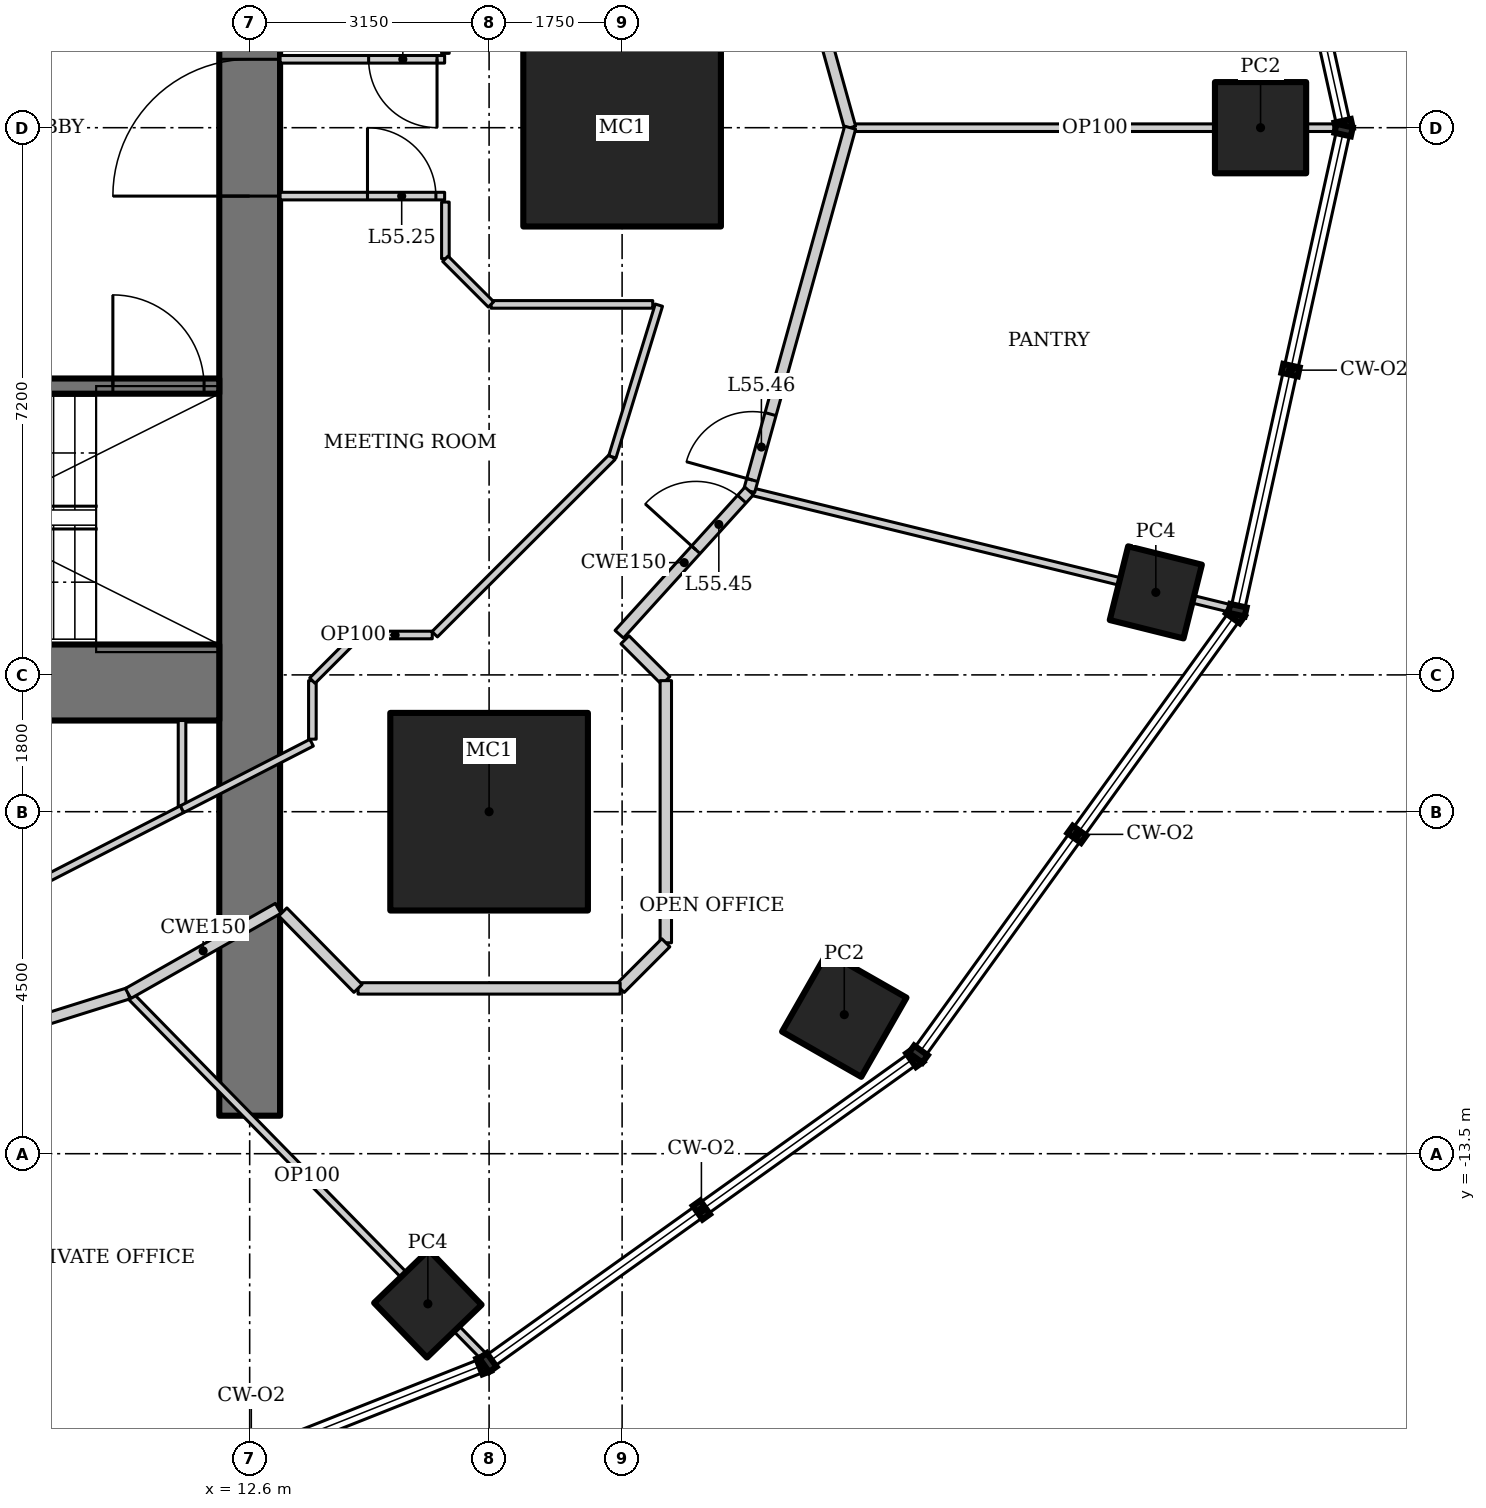
"""IFC4 building model, lengths in metres.
Left out: names, types, materials, properties, quantities, classifications, styles, units other than length and angle.
Written with IfcOpenShell. Run it as: python <this file> out.ifc"""

import sys

from ifc_helpers import new_model, si_unit, direction, frame, frame_2d, origin, origin_2d, place, context, subcontext, project, spatial, rectangle, hollow_rectangle, extrude, element, fill, save


model = new_model("IFC4")
c1 = context("Model", 3, precision=1e-05, world=origin(), true_north=direction((0.0, 1.0)))
c2 = subcontext(c1, "Body", "Model", "MODEL_VIEW")
j1 = project(units=[si_unit("LENGTHUNIT", "METRE"), si_unit("PLANEANGLEUNIT", "RADIAN")], contexts=[c1])
p1 = place(None, origin())
s1 = spatial("IfcSite", under=j1, at=p1, CompositionType="ELEMENT")
p2 = place(p1, origin())
s2 = spatial("IfcBuilding", under=s1, at=p2, CompositionType="ELEMENT")
p3 = place(p2, frame((0.0, 0.0, 236.8)))
s3 = spatial("IfcBuildingStorey", under=s2, at=p3, CompositionType="ELEMENT", Elevation=236.8)
for number, where, z_axis, x_axis in (
    (1, (17.5, 0.0, 0.0), (0.0, 0.0, 1.0), (1.0, 0.0, 0.0)),
    (2, (15.75, -9.0, 0.0), (0.0, 0.0, 1.0), (1.0, 0.0, 0.0)),
):
    element("IfcColumn", number, at=place(p3, frame(where, z_axis=z_axis, x_axis=x_axis)), inside=s3, PredefinedType="COLUMN", context=c2, shape_type="SweptSolid", body=[
        extrude(hollow_rectangle(XDim=2.6, YDim=2.6, WallThickness=0.13, at=origin_2d()), origin(), (0.0, 0.0, 1.0), 4.2),
    ])
p4 = place(p3, frame((25.9, 0.0, 0.0), z_axis=(0.0, 0.0, 1.0), x_axis=(1.0, 0.0, 0.0)))
e3 = element("IfcColumn", 3, at=p4, inside=s3, PredefinedType="COLUMN", context=c2, shape_type="SweptSolid", body=[
    extrude(hollow_rectangle(XDim=1.2, YDim=1.2, WallThickness=0.1, at=origin_2d()), origin(), (0.0, 0.0, 1.0), 4.2),
])
p5 = place(p3, frame((14.944, -15.475, 0.0), z_axis=(0.0, 0.0, 1.0), x_axis=(0.719339800339, 0.694658370459, 0.0)))
e4 = element("IfcColumn", 4, at=p5, inside=s3, PredefinedType="COLUMN", context=c2, shape_type="SweptSolid", body=[
    extrude(hollow_rectangle(XDim=1.0, YDim=1.0, WallThickness=0.08, at=origin_2d()), origin(), (0.0, 0.0, 1.0), 4.2),
])
p6 = place(p3, frame((20.423, -11.67, 0.0), z_axis=(0.0, 0.0, 1.0), x_axis=(0.496139221777, 0.86824298017, 0.0)))
e5 = element("IfcColumn", 5, at=p6, inside=s3, PredefinedType="COLUMN", context=c2, shape_type="SweptSolid", body=[
    extrude(hollow_rectangle(XDim=1.2, YDim=1.2, WallThickness=0.1, at=origin_2d()), origin(), (0.0, 0.0, 1.0), 4.2),
])
p7 = place(p3, frame((24.522, -6.114, 0.0), z_axis=(0.0, 0.0, 1.0), x_axis=(0.2419218956, 0.970295726276, 0.0)))
e6 = element("IfcColumn", 6, at=p7, inside=s3, PredefinedType="COLUMN", context=c2, shape_type="SweptSolid", body=[
    extrude(hollow_rectangle(XDim=1.0, YDim=1.0, WallThickness=0.08, at=origin_2d()), origin(), (0.0, 0.0, 1.0), 4.2),
])
p8 = place(p3, frame((12.6, -13.0, 0.0), z_axis=(0.0, 0.0, 1.0), x_axis=(0.0, 1.0, 0.0)))
e7 = element("IfcWall", 7, at=p8, inside=s3, PredefinedType="SHEAR", context=c2, shape_type="SweptSolid", body=[
    extrude(rectangle(XDim=26.0, YDim=0.8, at=frame_2d((13.0, 0.0))), origin(), (0.0, 0.0, 1.0), 4.2),
])
p9 = place(p8, frame((12.1, 0.0, 0.0)))
e8 = element("IfcOpeningElement", 8, at=p9, cuts=e7, PredefinedType="OPENING", context=c2, shape_type="SweptSolid", body=[
    extrude(rectangle(XDim=1.8, YDim=2.1, at=frame_2d((0.9, 1.05))), frame((0.0, 0.41, 0.0), z_axis=(0.0, -1.0, 0.0), x_axis=(1.0, 0.0, 0.0)), (0.0, 0.0, 1.0), 0.82),
])
p10 = place(p3, frame((-12.2, -7.3, 0.0), z_axis=(0.0, 0.0, 1.0), x_axis=(1.0, 0.0, 0.0)))
e9 = element("IfcWall", 9, at=p10, inside=s3, PredefinedType="SHEAR", context=c2, shape_type="SweptSolid", body=[
    extrude(rectangle(XDim=24.4, YDim=1.0, at=frame_2d((12.2, 0.0))), origin(), (0.0, 0.0, 1.0), 4.2),
])
p11 = place(p3, frame((5.6, -3.4, 0.0), z_axis=(0.0, 0.0, 1.0), x_axis=(1.0, 0.0, 0.0)))
e10 = element("IfcWall", 10, at=p11, inside=s3, PredefinedType="SHEAR", context=c2, shape_type="SweptSolid", body=[
    extrude(rectangle(XDim=6.6, YDim=0.2, at=frame_2d((3.3, 0.0))), origin(), (0.0, 0.0, 1.0), 4.2),
])
p12 = place(p11, frame((5.2, 0.0, 0.0)))
e11 = element("IfcOpeningElement", 11, at=p12, cuts=e10, PredefinedType="OPENING", context=c2, shape_type="SweptSolid", body=[
    extrude(rectangle(XDim=1.2, YDim=2.1, at=frame_2d((0.6, 1.05))), frame((0.0, 0.11, 0.0), z_axis=(0.0, -1.0, 0.0), x_axis=(1.0, 0.0, 0.0)), (0.0, 0.0, 1.0), 0.22),
])
p13 = place(p3, frame((26.944, 0.0, 0.0), z_axis=(0.0, 0.0, 1.0), x_axis=(-1.0, 0.0, 0.0)))
e12 = element("IfcWall", 12, at=p13, inside=s3, PredefinedType="PARTITIONING", context=c2, shape_type="SweptSolid", body=[
    extrude(rectangle(XDim=6.444, YDim=0.1, at=frame_2d((3.222, 0.0))), origin(), (0.0, 0.0, 1.0), 3.349),
])
p14 = place(p3, frame((15.709, -16.199, 0.0), z_axis=(0.0, 0.0, 1.0), x_axis=(-0.699758297028, 0.71437967898, 0.0)))
e13 = element("IfcWall", 13, at=p14, inside=s3, PredefinedType="PARTITIONING", context=c2, shape_type="SweptSolid", body=[
    extrude(rectangle(XDim=6.729, YDim=0.1, at=frame_2d((3.365, 0.0))), origin(), (0.0, 0.0, 1.0), 3.41),
])
p15 = place(p3, frame((25.543, -6.335, 0.0), z_axis=(0.0, 0.0, 1.0), x_axis=(-0.971467850621, 0.237171278215, 0.0)))
e14 = element("IfcWall", 14, at=p15, inside=s3, PredefinedType="PARTITIONING", context=c2, shape_type="SweptSolid", body=[
    extrude(rectangle(XDim=6.558, YDim=0.1, at=frame_2d((3.279, 0.0))), origin(), (0.0, 0.0, 1.0), 3.108),
])
p16 = place(p3, frame((20.5, 0.0, 0.0), z_axis=(0.0, 0.0, 1.0), x_axis=(-0.26770731566, 0.963500281859, 0.0)))
e15 = element("IfcWall", 15, at=p16, inside=s3, PredefinedType="PARTITIONING", context=c2, shape_type="SweptSolid", body=[
    extrude(rectangle(XDim=4.961, YDim=0.15, at=frame_2d((2.48, 0.0))), origin(), (0.0, 0.0, 1.0), 4.05),
])
p17 = place(p3, frame((6.521, -12.799, 0.0), z_axis=(0.0, 0.0, 1.0), x_axis=(0.954031103669, 0.299707612903, 0.0)))
e16 = element("IfcWall", 16, at=p17, inside=s3, PredefinedType="PARTITIONING", context=c2, shape_type="SweptSolid", body=[
    extrude(rectangle(XDim=4.695, YDim=0.15, at=frame_2d((2.348, 0.0))), origin(), (0.0, 0.0, 1.0), 4.05),
])
p18 = place(p17, frame((1.589, 0.0, 0.0)))
e17 = element("IfcOpeningElement", 17, at=p18, cuts=e16, PredefinedType="OPENING", context=c2, shape_type="SweptSolid", body=[
    extrude(rectangle(XDim=0.9, YDim=2.1, at=frame_2d((0.45, 1.05))), frame((0.0, 0.085, 0.0), z_axis=(0.0, -1.0, 0.0), x_axis=(1.0, 0.0, 0.0)), (0.0, 0.0, 1.0), 0.17),
])
p19 = place(p3, frame((19.172, -4.78, 0.0), z_axis=(0.0, 0.0, 1.0), x_axis=(0.26770731566, 0.963500281859, 0.0)))
e18 = element("IfcWall", 18, at=p19, inside=s3, PredefinedType="PARTITIONING", context=c2, shape_type="SweptSolid", body=[
    extrude(rectangle(XDim=4.961, YDim=0.15, at=frame_2d((2.48, 0.0))), origin(), (0.0, 0.0, 1.0), 4.05),
])
p20 = place(p19, frame((0.15, 0.0, 0.0)))
e19 = element("IfcOpeningElement", 19, at=p20, cuts=e18, PredefinedType="OPENING", context=c2, shape_type="SweptSolid", body=[
    extrude(rectangle(XDim=0.9, YDim=2.1, at=frame_2d((0.45, 1.05))), frame((0.0, 0.085, 0.0), z_axis=(0.0, -1.0, 0.0), x_axis=(1.0, 0.0, 0.0)), (0.0, 0.0, 1.0), 0.17),
])
p21 = place(p3, frame((11.71, -7.8, 0.0), z_axis=(0.0, 0.0, 1.0), x_axis=(0.0, -1.0, 0.0)))
e20 = element("IfcWall", 20, at=p21, inside=s3, PredefinedType="PARTITIONING", context=c2, shape_type="SweptSolid", body=[
    extrude(rectangle(XDim=1.167, YDim=0.1, at=frame_2d((0.583, 0.0))), origin(), (0.0, 0.0, 1.0), 4.05),
])
p22 = place(p3, frame((11.71, -8.967, 0.0), z_axis=(0.0, 0.0, 1.0), x_axis=(-0.889605609385, -0.456729525814, 0.0)))
e21 = element("IfcWall", 21, at=p22, inside=s3, PredefinedType="PARTITIONING", context=c2, shape_type="SweptSolid", body=[
    extrude(rectangle(XDim=2.293, YDim=0.1, at=frame_2d((1.146, 0.0))), origin(), (0.0, 0.0, 1.0), 4.05),
])
p23 = place(p3, frame((11.001, -11.392, 0.0), z_axis=(0.0, 0.0, 1.0), x_axis=(0.869722107117, 0.493541747366, 0.0)))
e22 = element("IfcWall", 22, at=p23, inside=s3, PredefinedType="PARTITIONING", context=c2, shape_type="SweptSolid", body=[
    extrude(rectangle(XDim=2.27, YDim=0.15, at=frame_2d((1.135, 0.0))), origin(), (0.0, 0.0, 1.0), 4.05),
])
p24 = place(p3, frame((17.463, -6.665, 0.0), z_axis=(0.0, 0.0, 1.0), x_axis=(0.671721890643, 0.74080341632, 0.0)))
e23 = element("IfcWall", 23, at=p24, inside=s3, PredefinedType="PARTITIONING", context=c2, shape_type="SweptSolid", body=[
    extrude(rectangle(XDim=2.544, YDim=0.15, at=frame_2d((1.272, 0.0))), origin(), (0.0, 0.0, 1.0), 4.05),
])
p25 = place(p24, frame((1.5, 0.0, 0.0)))
e24 = element("IfcOpeningElement", 24, at=p25, cuts=e23, PredefinedType="OPENING", context=c2, shape_type="SweptSolid", body=[
    extrude(rectangle(XDim=0.9, YDim=2.1, at=frame_2d((0.45, 1.05))), frame((0.0, 0.085, 0.0), z_axis=(0.0, -1.0, 0.0), x_axis=(1.0, 0.0, 0.0)), (0.0, 0.0, 1.0), 0.17),
])
p26 = place(p3, frame((17.372, -4.331, 0.0), z_axis=(0.0, 0.0, 1.0), x_axis=(-0.707587114823, -0.70662612104, 0.0)))
e25 = element("IfcWall", 25, at=p26, inside=s3, PredefinedType="PARTITIONING", context=c2, shape_type="SweptSolid", body=[
    extrude(rectangle(XDim=3.303, YDim=0.1, at=frame_2d((1.651, 0.0))), origin(), (0.0, 0.0, 1.0), 4.05),
])
p27 = place(p3, frame((13.415, -8.092, 0.0), z_axis=(0.0, 0.0, 1.0), x_axis=(-0.889638356137, -0.456665736935, 0.0)))
e26 = element("IfcWall", 26, at=p27, inside=s3, PredefinedType="PARTITIONING", context=c2, shape_type="SweptSolid", body=[
    extrude(rectangle(XDim=1.917, YDim=0.1, at=frame_2d((0.958, 0.0))), origin(), (0.0, 0.0, 1.0), 4.05),
])
p28 = place(p3, frame((13.425, -8.046, 0.0), z_axis=(0.0, 0.0, 1.0), x_axis=(0.0, 1.0, 0.0)))
e27 = element("IfcWall", 27, at=p28, inside=s3, PredefinedType="PARTITIONING", context=c2, shape_type="SweptSolid", body=[
    extrude(rectangle(XDim=0.77, YDim=0.1, at=frame_2d((0.385, 0.0))), origin(), (0.0, 0.0, 1.0), 4.05),
])
p29 = place(p3, frame((13.425, -7.275, 0.0), z_axis=(0.0, 0.0, 1.0), x_axis=(0.707106781187, 0.707106781187, 0.0)))
e28 = element("IfcWall", 28, at=p29, inside=s3, PredefinedType="PARTITIONING", context=c2, shape_type="SweptSolid", body=[
    extrude(rectangle(XDim=0.849, YDim=0.1, at=frame_2d((0.425, 0.0))), origin(), (0.0, 0.0, 1.0), 4.05),
])
p30 = place(p3, frame((14.025, -6.675, 0.0), z_axis=(0.0, 0.0, 1.0), x_axis=(1.0, 0.0, 0.0)))
e29 = element("IfcWall", 29, at=p30, inside=s3, PredefinedType="PARTITIONING", context=c2, shape_type="SweptSolid", body=[
    extrude(rectangle(XDim=0.977, YDim=0.1, at=frame_2d((0.488, 0.0))), origin(), (0.0, 0.0, 1.0), 4.05),
])
p31 = place(p3, frame((17.538, -6.738, 0.0), z_axis=(0.0, 0.0, 1.0), x_axis=(0.707106781187, -0.707106781187, 0.0)))
e30 = element("IfcWall", 30, at=p31, inside=s3, PredefinedType="PARTITIONING", context=c2, shape_type="SweptSolid", body=[
    extrude(rectangle(XDim=0.76, YDim=0.15, at=frame_2d((0.38, 0.0))), origin(), (0.0, 0.0, 1.0), 4.05),
])
p32 = place(p3, frame((18.075, -7.275, 0.0), z_axis=(0.0, 0.0, 1.0), x_axis=(0.0, -1.0, 0.0)))
e31 = element("IfcWall", 31, at=p32, inside=s3, PredefinedType="PARTITIONING", context=c2, shape_type="SweptSolid", body=[
    extrude(rectangle(XDim=3.449, YDim=0.15, at=frame_2d((1.725, 0.0))), origin(), (0.0, 0.0, 1.0), 3.6),
])
p33 = place(p3, frame((18.075, -10.725, 0.0), z_axis=(0.0, 0.0, 1.0), x_axis=(-0.707106781187, -0.707106781187, 0.0)))
e32 = element("IfcWall", 32, at=p33, inside=s3, PredefinedType="PARTITIONING", context=c2, shape_type="SweptSolid", body=[
    extrude(rectangle(XDim=0.849, YDim=0.15, at=frame_2d((0.425, 0.0))), origin(), (0.0, 0.0, 1.0), 4.05),
])
p34 = place(p3, frame((17.475, -11.325, 0.0), z_axis=(0.0, 0.0, 1.0), x_axis=(-1.0, 0.0, 0.0)))
e33 = element("IfcWall", 33, at=p34, inside=s3, PredefinedType="PARTITIONING", context=c2, shape_type="SweptSolid", body=[
    extrude(rectangle(XDim=3.449, YDim=0.15, at=frame_2d((1.725, 0.0))), origin(), (0.0, 0.0, 1.0), 4.05),
])
p35 = place(p3, frame((14.025, -11.325, 0.0), z_axis=(0.0, 0.0, 1.0), x_axis=(-0.701113567316, 0.713049623606, 0.0)))
e34 = element("IfcWall", 34, at=p35, inside=s3, PredefinedType="PARTITIONING", context=c2, shape_type="SweptSolid", body=[
    extrude(rectangle(XDim=1.411, YDim=0.15, at=frame_2d((0.706, 0.0))), origin(), (0.0, 0.0, 1.0), 4.05),
])
p36 = place(p3, frame((13.0, -0.9, 0.0), z_axis=(0.0, 0.0, 1.0), x_axis=(1.0, 0.0, 0.0)))
e35 = element("IfcWall", 35, at=p36, inside=s3, PredefinedType="PARTITIONING", context=c2, shape_type="SweptSolid", body=[
    extrude(rectangle(XDim=2.165, YDim=0.1, at=frame_2d((1.083, 0.0))), origin(), (0.0, 0.0, 1.0), 4.05),
])
p37 = place(p36, frame((1.15, 0.0, 0.0)))
e36 = element("IfcOpeningElement", 36, at=p37, cuts=e35, PredefinedType="OPENING", context=c2, shape_type="SweptSolid", body=[
    extrude(rectangle(XDim=0.9, YDim=2.1, at=frame_2d((0.45, 1.05))), frame((0.0, 0.06, 0.0), z_axis=(0.0, -1.0, 0.0), x_axis=(1.0, 0.0, 0.0)), (0.0, 0.0, 1.0), 0.12),
])
p38 = place(p3, frame((17.984, -2.335, 0.0), z_axis=(0.0, 0.0, 1.0), x_axis=(-0.293231279211, -0.956041535129, 0.0)))
e37 = element("IfcWall", 37, at=p38, inside=s3, PredefinedType="PARTITIONING", context=c2, shape_type="SweptSolid", body=[
    extrude(rectangle(XDim=2.088, YDim=0.1, at=frame_2d((1.044, 0.0))), origin(), (0.0, 0.0, 1.0), 4.05),
])
p39 = place(p3, frame((15.165, 0.9, 0.0), z_axis=(0.0, 0.0, 1.0), x_axis=(-1.0, 0.0, 0.0)))
e38 = element("IfcWall", 38, at=p39, inside=s3, PredefinedType="PARTITIONING", context=c2, shape_type="SweptSolid", body=[
    extrude(rectangle(XDim=2.165, YDim=0.1, at=frame_2d((1.083, 0.0))), origin(), (0.0, 0.0, 1.0), 4.05),
])
p40 = place(p39, frame((0.1, 0.0, 0.0)))
e39 = element("IfcOpeningElement", 39, at=p40, cuts=e38, PredefinedType="OPENING", context=c2, shape_type="SweptSolid", body=[
    extrude(rectangle(XDim=0.9, YDim=2.1, at=frame_2d((0.45, 1.05))), frame((0.0, 0.06, 0.0), z_axis=(0.0, -1.0, 0.0), x_axis=(1.0, 0.0, 0.0)), (0.0, 0.0, 1.0), 0.12),
])
p41 = place(p3, frame((15.175, -1.725, 0.0), z_axis=(0.0, 0.0, 1.0), x_axis=(0.0, 1.0, 0.0)))
e40 = element("IfcWall", 40, at=p41, inside=s3, PredefinedType="PARTITIONING", context=c2, shape_type="SweptSolid", body=[
    extrude(rectangle(XDim=0.746, YDim=0.1, at=frame_2d((0.373, 0.0))), origin(), (0.0, 0.0, 1.0), 4.05),
])
p42 = place(p3, frame((17.903, -2.325, 0.0), z_axis=(0.0, 0.0, 1.0), x_axis=(-1.0, 0.0, 0.0)))
e41 = element("IfcWall", 41, at=p42, inside=s3, PredefinedType="PARTITIONING", context=c2, shape_type="SweptSolid", body=[
    extrude(rectangle(XDim=2.128, YDim=0.1, at=frame_2d((1.064, 0.0))), origin(), (0.0, 0.0, 1.0), 4.05),
])
p43 = place(p3, frame((15.775, -2.325, 0.0), z_axis=(0.0, 0.0, 1.0), x_axis=(-0.707106781187, 0.707106781187, 0.0)))
e42 = element("IfcWall", 42, at=p43, inside=s3, PredefinedType="PARTITIONING", context=c2, shape_type="SweptSolid", body=[
    extrude(rectangle(XDim=0.849, YDim=0.1, at=frame_2d((0.425, 0.0))), origin(), (0.0, 0.0, 1.0), 4.05),
])
p44 = place(p3, frame((15.175, 0.978, 0.0), z_axis=(0.0, 0.0, 1.0), x_axis=(0.0, 1.0, 0.0)))
e43 = element("IfcWall", 43, at=p44, inside=s3, PredefinedType="PARTITIONING", context=c2, shape_type="SweptSolid", body=[
    extrude(rectangle(XDim=0.746, YDim=0.1, at=frame_2d((0.373, 0.0))), origin(), (0.0, 0.0, 1.0), 4.05),
])
p45 = place(p12, origin())
e44 = element("IfcDoor", 44, at=p45, inside=s3, OperationType="SINGLE_SWING_RIGHT", PredefinedType="DOOR", context=c2, shape_type="SweptSolid", body=[
    extrude(rectangle(XDim=1.2, YDim=2.1, at=frame_2d((0.6, 1.05))), frame((0.0, 0.025, 0.0), z_axis=(0.0, -1.0, 0.0), x_axis=(1.0, 0.0, 0.0)), (0.0, 0.0, 1.0), 0.05),
])
fill(e11, e44)
p46 = place(p9, origin())
e45 = element("IfcDoor", 45, at=p46, inside=s3, OperationType="DOUBLE_DOOR_DOUBLE_SWING", PredefinedType="DOOR", context=c2, shape_type="SweptSolid", body=[
    extrude(rectangle(XDim=1.8, YDim=2.1, at=frame_2d((0.9, 1.05))), frame((0.0, 0.025, 0.0), z_axis=(0.0, -1.0, 0.0), x_axis=(1.0, 0.0, 0.0)), (0.0, 0.0, 1.0), 0.05),
])
fill(e8, e45)
p47 = place(p37, origin())
e46 = element("IfcDoor", 46, at=p47, inside=s3, OperationType="SINGLE_SWING_LEFT", PredefinedType="DOOR", context=c2, shape_type="SweptSolid", body=[
    extrude(rectangle(XDim=0.9, YDim=2.1, at=frame_2d((0.45, 1.05))), frame((0.0, 0.025, 0.0), z_axis=(0.0, -1.0, 0.0), x_axis=(1.0, 0.0, 0.0)), (0.0, 0.0, 1.0), 0.05),
])
fill(e36, e46)
p48 = place(p40, origin())
e47 = element("IfcDoor", 47, at=p48, inside=s3, OperationType="SINGLE_SWING_LEFT", PredefinedType="DOOR", context=c2, shape_type="SweptSolid", body=[
    extrude(rectangle(XDim=0.9, YDim=2.1, at=frame_2d((0.45, 1.05))), frame((0.0, 0.025, 0.0), z_axis=(0.0, -1.0, 0.0), x_axis=(1.0, 0.0, 0.0)), (0.0, 0.0, 1.0), 0.05),
])
fill(e39, e47)
p49 = place(p25, origin())
e48 = element("IfcDoor", 48, at=p49, inside=s3, OperationType="SINGLE_SWING_LEFT", PredefinedType="DOOR", context=c2, shape_type="SweptSolid", body=[
    extrude(rectangle(XDim=0.9, YDim=2.1, at=frame_2d((0.45, 1.05))), frame((0.0, 0.025, 0.0), z_axis=(0.0, -1.0, 0.0), x_axis=(1.0, 0.0, 0.0)), (0.0, 0.0, 1.0), 0.05),
])
fill(e24, e48)
p50 = place(p20, origin())
e49 = element("IfcDoor", 49, at=p50, inside=s3, OperationType="SINGLE_SWING_LEFT", PredefinedType="DOOR", context=c2, shape_type="SweptSolid", body=[
    extrude(rectangle(XDim=0.9, YDim=2.1, at=frame_2d((0.45, 1.05))), frame((0.0, 0.025, 0.0), z_axis=(0.0, -1.0, 0.0), x_axis=(1.0, 0.0, 0.0)), (0.0, 0.0, 1.0), 0.05),
])
fill(e19, e49)
save(model, sys.argv[1])
